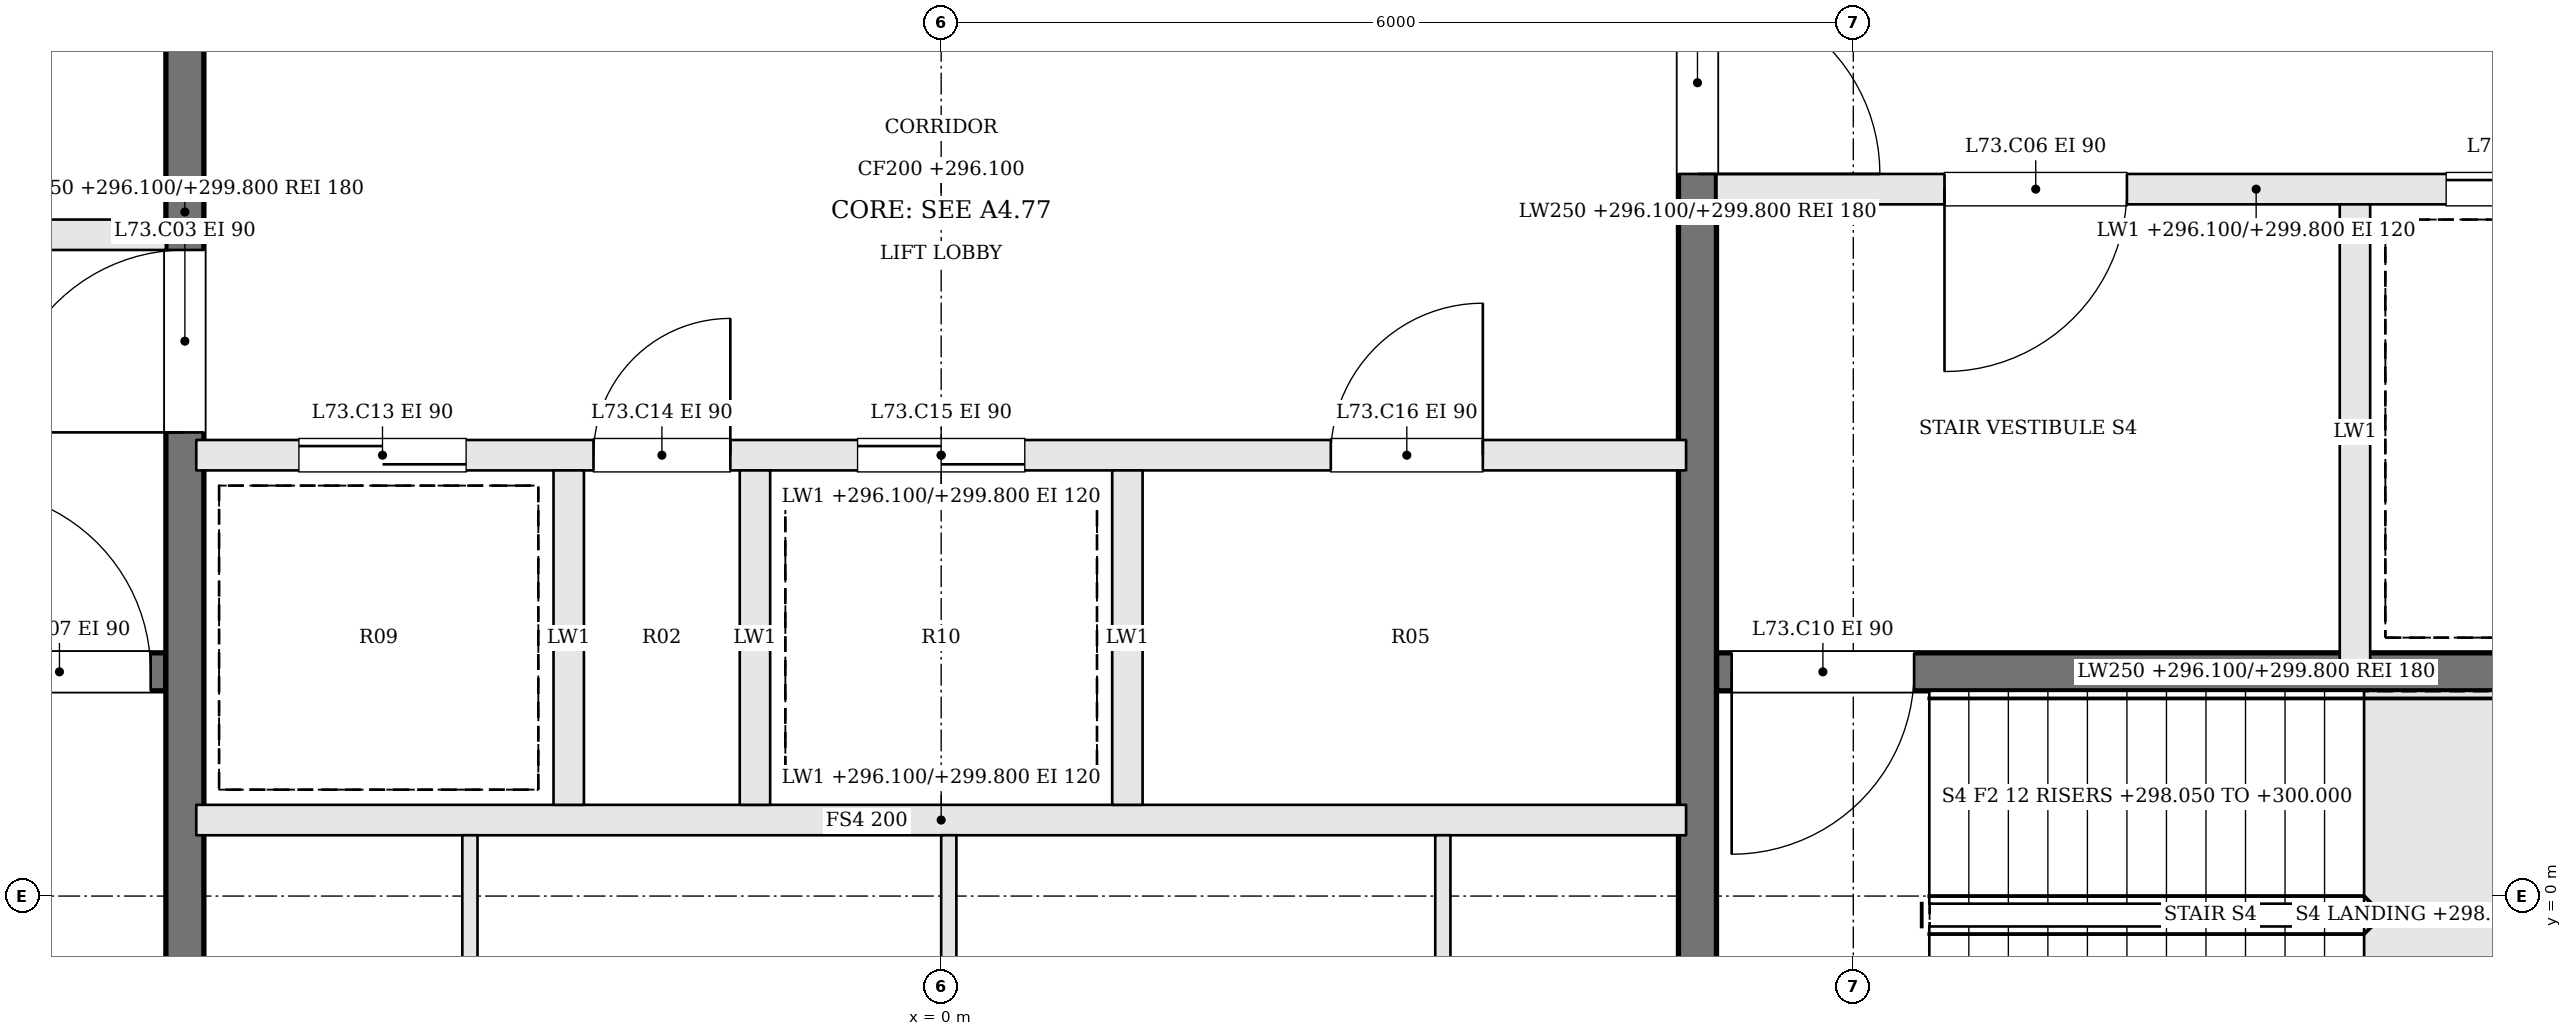
"""IFC4 building model, lengths in metres.
Left out: names, types, materials, properties, quantities, classifications, styles, units other than length and angle.
Written with IfcOpenShell. Run it as: python <this file> out.ifc"""

import sys

from ifc_helpers import new_model, si_unit, direction, frame, frame_2d, origin, place, context, subcontext, project, spatial, rectangle, extrude, element, fill, save


model = new_model("IFC4")
c1 = context("Model", 3, precision=1e-05, world=origin(), true_north=direction((0.0, 1.0)))
c2 = subcontext(c1, "Body", "Model", "MODEL_VIEW")
j1 = project(units=[si_unit("LENGTHUNIT", "METRE"), si_unit("PLANEANGLEUNIT", "RADIAN")], contexts=[c1])
p1 = place(None, origin())
s1 = spatial("IfcSite", under=j1, at=p1, CompositionType="ELEMENT")
p2 = place(p1, origin())
s2 = spatial("IfcBuilding", under=s1, at=p2, CompositionType="ELEMENT")
p3 = place(p2, frame((0.0, 0.0, 296.1)))
s3 = spatial("IfcBuildingStorey", under=s2, at=p3, CompositionType="ELEMENT", Elevation=296.1)
p4 = place(p3, frame((-12.2, 1.475, 0.0), z_axis=(0.0, 0.0, 1.0), x_axis=(1.0, 0.0, 0.0)))
e1 = element("IfcWall", 1, at=p4, inside=s3, PredefinedType="SOLIDWALL", context=c2, shape_type="SweptSolid", body=[
    extrude(rectangle(XDim=7.1, YDim=0.25, at=frame_2d((3.55, 0.0))), origin(), (0.0, 0.0, 1.0), 3.7),
])
p5 = place(p4, frame((5.8, 0.0, 0.0)))
e2 = element("IfcOpeningElement", 2, at=p5, cuts=e1, PredefinedType="OPENING", context=c2, shape_type="SweptSolid", body=[
    extrude(rectangle(XDim=1.2, YDim=2.1, at=frame_2d((0.6, 1.05))), frame((0.0, 0.135, 0.0), z_axis=(0.0, -1.0, 0.0), x_axis=(1.0, 0.0, 0.0)), (0.0, 0.0, 1.0), 0.27),
])
p6 = place(p3, frame((-12.2, 4.35, 0.0), z_axis=(0.0, 0.0, 1.0), x_axis=(1.0, 0.0, 0.0)))
e3 = element("IfcWall", 3, at=p6, inside=s3, PredefinedType="SOLIDWALL", context=c2, shape_type="SweptSolid", body=[
    extrude(rectangle(XDim=7.1, YDim=0.2, at=frame_2d((3.55, 0.0))), origin(), (0.0, 0.0, 1.0), 3.7),
])
p7 = place(p6, frame((4.4, 0.0, 0.0)))
e4 = element("IfcOpeningElement", 4, at=p7, cuts=e3, PredefinedType="OPENING", context=c2, shape_type="SweptSolid", body=[
    extrude(rectangle(XDim=1.2, YDim=2.1, at=frame_2d((0.6, 1.05))), frame((0.0, 0.11, 0.0), z_axis=(0.0, -1.0, 0.0), x_axis=(1.0, 0.0, 0.0)), (0.0, 0.0, 1.0), 0.22),
])
p8 = place(p6, frame((1.1, 0.0, 0.0)))
e5 = element("IfcOpeningElement", 5, at=p8, cuts=e3, PredefinedType="OPENING", context=c2, shape_type="SweptSolid", body=[
    extrude(rectangle(XDim=1.2, YDim=2.1, at=frame_2d((0.6, 1.05))), frame((0.0, 0.11, 0.0), z_axis=(0.0, -1.0, 0.0), x_axis=(1.0, 0.0, 0.0)), (0.0, 0.0, 1.0), 0.22),
])
p9 = place(p3, frame((12.2, 4.65, 0.0), z_axis=(0.0, 0.0, 1.0), x_axis=(-1.0, 0.0, 0.0)))
e6 = element("IfcWall", 6, at=p9, inside=s3, PredefinedType="SOLIDWALL", context=c2, shape_type="SweptSolid", body=[
    extrude(rectangle(XDim=7.1, YDim=0.2, at=frame_2d((3.55, 0.0))), origin(), (0.0, 0.0, 1.0), 3.7),
])
p10 = place(p9, frame((4.4, 0.0, 0.0)))
e7 = element("IfcOpeningElement", 7, at=p10, cuts=e6, PredefinedType="OPENING", context=c2, shape_type="SweptSolid", body=[
    extrude(rectangle(XDim=1.2, YDim=2.1, at=frame_2d((0.6, 1.05))), frame((0.0, 0.11, 0.0), z_axis=(0.0, -1.0, 0.0), x_axis=(1.0, 0.0, 0.0)), (0.0, 0.0, 1.0), 0.22),
])
p11 = place(p9, frame((1.1, 0.0, 0.0)))
e8 = element("IfcOpeningElement", 8, at=p11, cuts=e6, PredefinedType="OPENING", context=c2, shape_type="SweptSolid", body=[
    extrude(rectangle(XDim=1.2, YDim=2.1, at=frame_2d((0.6, 1.05))), frame((0.0, 0.11, 0.0), z_axis=(0.0, -1.0, 0.0), x_axis=(1.0, 0.0, 0.0)), (0.0, 0.0, 1.0), 0.22),
])
p12 = place(p3, frame((12.2, 1.475, 0.0), z_axis=(0.0, 0.0, 1.0), x_axis=(-1.0, 0.0, 0.0)))
e9 = element("IfcWall", 9, at=p12, inside=s3, PredefinedType="SOLIDWALL", context=c2, shape_type="SweptSolid", body=[
    extrude(rectangle(XDim=7.1, YDim=0.25, at=frame_2d((3.55, 0.0))), origin(), (0.0, 0.0, 1.0), 3.7),
])
p13 = place(p12, frame((5.8, 0.0, 0.0)))
e10 = element("IfcOpeningElement", 10, at=p13, cuts=e9, PredefinedType="OPENING", context=c2, shape_type="SweptSolid", body=[
    extrude(rectangle(XDim=1.2, YDim=2.1, at=frame_2d((0.6, 1.05))), frame((0.0, 0.135, 0.0), z_axis=(0.0, -1.0, 0.0), x_axis=(1.0, 0.0, 0.0)), (0.0, 0.0, 1.0), 0.27),
])
p14 = place(p3, frame((9.3, 4.55, 0.0), z_axis=(0.0, 0.0, 1.0), x_axis=(0.0, -1.0, 0.0)))
e11 = element("IfcWall", 11, at=p14, inside=s3, PredefinedType="SOLIDWALL", context=c2, shape_type="SweptSolid", body=[
    extrude(rectangle(XDim=3.0, YDim=0.2, at=frame_2d((1.5, 0.0))), origin(), (0.0, 0.0, 1.0), 3.7),
])
p15 = place(p3, frame((-4.975, -2.2, 0.0), z_axis=(0.0, 0.0, 1.0), x_axis=(0.0, 1.0, 0.0)))
e12 = element("IfcWall", 12, at=p15, inside=s3, PredefinedType="SOLIDWALL", context=c2, shape_type="SweptSolid", body=[
    extrude(rectangle(XDim=13.4, YDim=0.25, at=frame_2d((6.7, 0.0))), origin(), (0.0, 0.0, 1.0), 3.7),
])
p16 = place(p15, frame((5.25, 0.0, 0.0)))
e13 = element("IfcOpeningElement", 13, at=p16, cuts=e12, PredefinedType="OPENING", context=c2, shape_type="SweptSolid", body=[
    extrude(rectangle(XDim=1.2, YDim=2.1, at=frame_2d((0.6, 1.05))), frame((0.0, 0.135, 0.0), z_axis=(0.0, -1.0, 0.0), x_axis=(1.0, 0.0, 0.0)), (0.0, 0.0, 1.0), 0.27),
])
p17 = place(p3, frame((4.975, 11.2, 0.0), z_axis=(0.0, 0.0, 1.0), x_axis=(0.0, -1.0, 0.0)))
e14 = element("IfcWall", 14, at=p17, inside=s3, PredefinedType="SOLIDWALL", context=c2, shape_type="SweptSolid", body=[
    extrude(rectangle(XDim=13.4, YDim=0.25, at=frame_2d((6.7, 0.0))), origin(), (0.0, 0.0, 1.0), 3.7),
])
p18 = place(p17, frame((5.25, 0.0, 0.0)))
e15 = element("IfcOpeningElement", 15, at=p18, cuts=e14, PredefinedType="OPENING", context=c2, shape_type="SweptSolid", body=[
    extrude(rectangle(XDim=1.2, YDim=2.1, at=frame_2d((0.6, 1.05))), frame((0.0, 0.135, 0.0), z_axis=(0.0, -1.0, 0.0), x_axis=(1.0, 0.0, 0.0)), (0.0, 0.0, 1.0), 0.27),
])
p19 = place(p3, frame((-4.9, 0.5, 0.0), z_axis=(0.0, 0.0, 1.0), x_axis=(1.0, 0.0, 0.0)))
e16 = element("IfcWall", 16, at=p19, inside=s3, PredefinedType="SOLIDWALL", context=c2, shape_type="SweptSolid", body=[
    extrude(rectangle(XDim=9.8, YDim=0.2, at=frame_2d((4.9, 0.0))), origin(), (0.0, 0.0, 1.0), 3.7),
])
p20 = place(p3, frame((-4.9, 2.9, 0.0), z_axis=(0.0, 0.0, 1.0), x_axis=(1.0, 0.0, 0.0)))
e17 = element("IfcWall", 17, at=p20, inside=s3, PredefinedType="SOLIDWALL", context=c2, shape_type="SweptSolid", body=[
    extrude(rectangle(XDim=9.8, YDim=0.2, at=frame_2d((4.9, 0.0))), origin(), (0.0, 0.0, 1.0), 3.7),
])
p21 = place(p20, frame((0.675, 0.0, 0.0)))
e18 = element("IfcOpeningElement", 18, at=p21, cuts=e17, PredefinedType="OPENING", context=c2, shape_type="SweptSolid", body=[
    extrude(rectangle(XDim=1.1, YDim=2.1, at=frame_2d((0.55, 1.05))), frame((0.0, 0.11, 0.0), z_axis=(0.0, -1.0, 0.0), x_axis=(1.0, 0.0, 0.0)), (0.0, 0.0, 1.0), 0.22),
])
p22 = place(p20, frame((2.613, 0.0, 0.0)))
e19 = element("IfcOpeningElement", 19, at=p22, cuts=e17, PredefinedType="OPENING", context=c2, shape_type="SweptSolid", body=[
    extrude(rectangle(XDim=0.9, YDim=2.1, at=frame_2d((0.45, 1.05))), frame((0.0, 0.11, 0.0), z_axis=(0.0, -1.0, 0.0), x_axis=(1.0, 0.0, 0.0)), (0.0, 0.0, 1.0), 0.22),
])
p23 = place(p20, frame((4.35, 0.0, 0.0)))
e20 = element("IfcOpeningElement", 20, at=p23, cuts=e17, PredefinedType="OPENING", context=c2, shape_type="SweptSolid", body=[
    extrude(rectangle(XDim=1.1, YDim=2.1, at=frame_2d((0.55, 1.05))), frame((0.0, 0.11, 0.0), z_axis=(0.0, -1.0, 0.0), x_axis=(1.0, 0.0, 0.0)), (0.0, 0.0, 1.0), 0.22),
])
p24 = place(p20, frame((7.463, 0.0, 0.0)))
e21 = element("IfcOpeningElement", 21, at=p24, cuts=e17, PredefinedType="OPENING", context=c2, shape_type="SweptSolid", body=[
    extrude(rectangle(XDim=1.0, YDim=2.1, at=frame_2d((0.5, 1.05))), frame((0.0, 0.11, 0.0), z_axis=(0.0, -1.0, 0.0), x_axis=(1.0, 0.0, 0.0)), (0.0, 0.0, 1.0), 0.22),
])
for number, where, z_axis, x_axis in (
    (22, (-2.45, 0.6, 0.0), (0.0, 0.0, 1.0), (0.0, 1.0, 0.0)),
    (23, (-1.225, 0.6, 0.0), (0.0, 0.0, 1.0), (0.0, 1.0, 0.0)),
    (24, (1.225, 0.6, 0.0), (0.0, 0.0, 1.0), (0.0, 1.0, 0.0)),
):
    element("IfcWall", number, at=place(p3, frame(where, z_axis=z_axis, x_axis=x_axis)), inside=s3, PredefinedType="SOLIDWALL", context=c2, shape_type="SweptSolid", body=[
        extrude(rectangle(XDim=2.2, YDim=0.2, at=frame_2d((1.1, 0.0))), origin(), (0.0, 0.0, 1.0), 3.7),
    ])
for number, where, z_axis, x_axis in (
    (25, (-3.1, -2.2, 0.0), (0.0, 0.0, 1.0), (0.0, 1.0, 0.0)),
    (26, (0.05, -2.2, 0.0), (0.0, 0.0, 1.0), (0.0, 1.0, 0.0)),
    (27, (3.3, -2.2, 0.0), (0.0, 0.0, 1.0), (0.0, 1.0, 0.0)),
):
    element("IfcWall", number, at=place(p3, frame(where, z_axis=z_axis, x_axis=x_axis)), inside=s3, PredefinedType="PARTITIONING", context=c2, shape_type="SweptSolid", body=[
        extrude(rectangle(XDim=2.6, YDim=0.1, at=frame_2d((1.3, 0.0))), origin(), (0.0, 0.0, 1.0), 3.7),
    ])
p25 = place(p16, origin())
e28 = element("IfcDoor", 28, at=p25, inside=s3, OperationType="SINGLE_SWING_LEFT", PredefinedType="DOOR", context=c2, shape_type="SweptSolid", body=[
    extrude(rectangle(XDim=1.2, YDim=2.1, at=frame_2d((0.6, 1.05))), frame((0.0, 0.025, 0.0), z_axis=(0.0, -1.0, 0.0), x_axis=(1.0, 0.0, 0.0)), (0.0, 0.0, 1.0), 0.05),
])
fill(e13, e28)
p26 = place(p18, origin())
e29 = element("IfcDoor", 29, at=p26, inside=s3, OperationType="SINGLE_SWING_RIGHT", PredefinedType="DOOR", context=c2, shape_type="SweptSolid", body=[
    extrude(rectangle(XDim=1.2, YDim=2.1, at=frame_2d((0.6, 1.05))), frame((0.0, 0.025, 0.0), z_axis=(0.0, -1.0, 0.0), x_axis=(1.0, 0.0, 0.0)), (0.0, 0.0, 1.0), 0.05),
])
fill(e15, e29)
p27 = place(p10, origin())
e30 = element("IfcDoor", 30, at=p27, inside=s3, OperationType="SINGLE_SWING_RIGHT", PredefinedType="DOOR", context=c2, shape_type="SweptSolid", body=[
    extrude(rectangle(XDim=1.2, YDim=2.1, at=frame_2d((0.6, 1.05))), frame((0.0, 0.025, 0.0), z_axis=(0.0, -1.0, 0.0), x_axis=(1.0, 0.0, 0.0)), (0.0, 0.0, 1.0), 0.05),
])
fill(e7, e30)
p28 = place(p5, origin())
e31 = element("IfcDoor", 31, at=p28, inside=s3, OperationType="SINGLE_SWING_LEFT", PredefinedType="DOOR", context=c2, shape_type="SweptSolid", body=[
    extrude(rectangle(XDim=1.2, YDim=2.1, at=frame_2d((0.6, 1.05))), frame((0.0, 0.025, 0.0), z_axis=(0.0, -1.0, 0.0), x_axis=(1.0, 0.0, 0.0)), (0.0, 0.0, 1.0), 0.05),
])
fill(e2, e31)
p29 = place(p13, origin())
e32 = element("IfcDoor", 32, at=p29, inside=s3, OperationType="SINGLE_SWING_RIGHT", PredefinedType="DOOR", context=c2, shape_type="SweptSolid", body=[
    extrude(rectangle(XDim=1.2, YDim=2.1, at=frame_2d((0.6, 1.05))), frame((0.0, 0.025, 0.0), z_axis=(0.0, -1.0, 0.0), x_axis=(1.0, 0.0, 0.0)), (0.0, 0.0, 1.0), 0.05),
])
fill(e10, e32)
p30 = place(p11, origin())
e33 = element("IfcDoor", 33, at=p30, inside=s3, OperationType="SLIDING_TO_RIGHT", PredefinedType="DOOR", context=c2, shape_type="SweptSolid", body=[
    extrude(rectangle(XDim=1.2, YDim=2.1, at=frame_2d((0.6, 1.05))), frame((0.0, 0.025, 0.0), z_axis=(0.0, -1.0, 0.0), x_axis=(1.0, 0.0, 0.0)), (0.0, 0.0, 1.0), 0.05),
])
fill(e8, e33)
p31 = place(p21, origin())
e34 = element("IfcDoor", 34, at=p31, inside=s3, OperationType="SLIDING_TO_RIGHT", PredefinedType="DOOR", context=c2, shape_type="SweptSolid", body=[
    extrude(rectangle(XDim=1.1, YDim=2.1, at=frame_2d((0.55, 1.05))), frame((0.0, 0.025, 0.0), z_axis=(0.0, -1.0, 0.0), x_axis=(1.0, 0.0, 0.0)), (0.0, 0.0, 1.0), 0.05),
])
fill(e18, e34)
p32 = place(p22, origin())
e35 = element("IfcDoor", 35, at=p32, inside=s3, OperationType="SINGLE_SWING_RIGHT", PredefinedType="DOOR", context=c2, shape_type="SweptSolid", body=[
    extrude(rectangle(XDim=0.9, YDim=2.1, at=frame_2d((0.45, 1.05))), frame((0.0, 0.025, 0.0), z_axis=(0.0, -1.0, 0.0), x_axis=(1.0, 0.0, 0.0)), (0.0, 0.0, 1.0), 0.05),
])
fill(e19, e35)
p33 = place(p23, origin())
e36 = element("IfcDoor", 36, at=p33, inside=s3, OperationType="SLIDING_TO_LEFT", PredefinedType="DOOR", context=c2, shape_type="SweptSolid", body=[
    extrude(rectangle(XDim=1.1, YDim=2.1, at=frame_2d((0.55, 1.05))), frame((0.0, 0.025, 0.0), z_axis=(0.0, -1.0, 0.0), x_axis=(1.0, 0.0, 0.0)), (0.0, 0.0, 1.0), 0.05),
])
fill(e20, e36)
p34 = place(p24, origin())
e37 = element("IfcDoor", 37, at=p34, inside=s3, OperationType="SINGLE_SWING_RIGHT", PredefinedType="DOOR", context=c2, shape_type="SweptSolid", body=[
    extrude(rectangle(XDim=1.0, YDim=2.1, at=frame_2d((0.5, 1.05))), frame((0.0, 0.025, 0.0), z_axis=(0.0, -1.0, 0.0), x_axis=(1.0, 0.0, 0.0)), (0.0, 0.0, 1.0), 0.05),
])
fill(e21, e37)
save(model, sys.argv[1])
